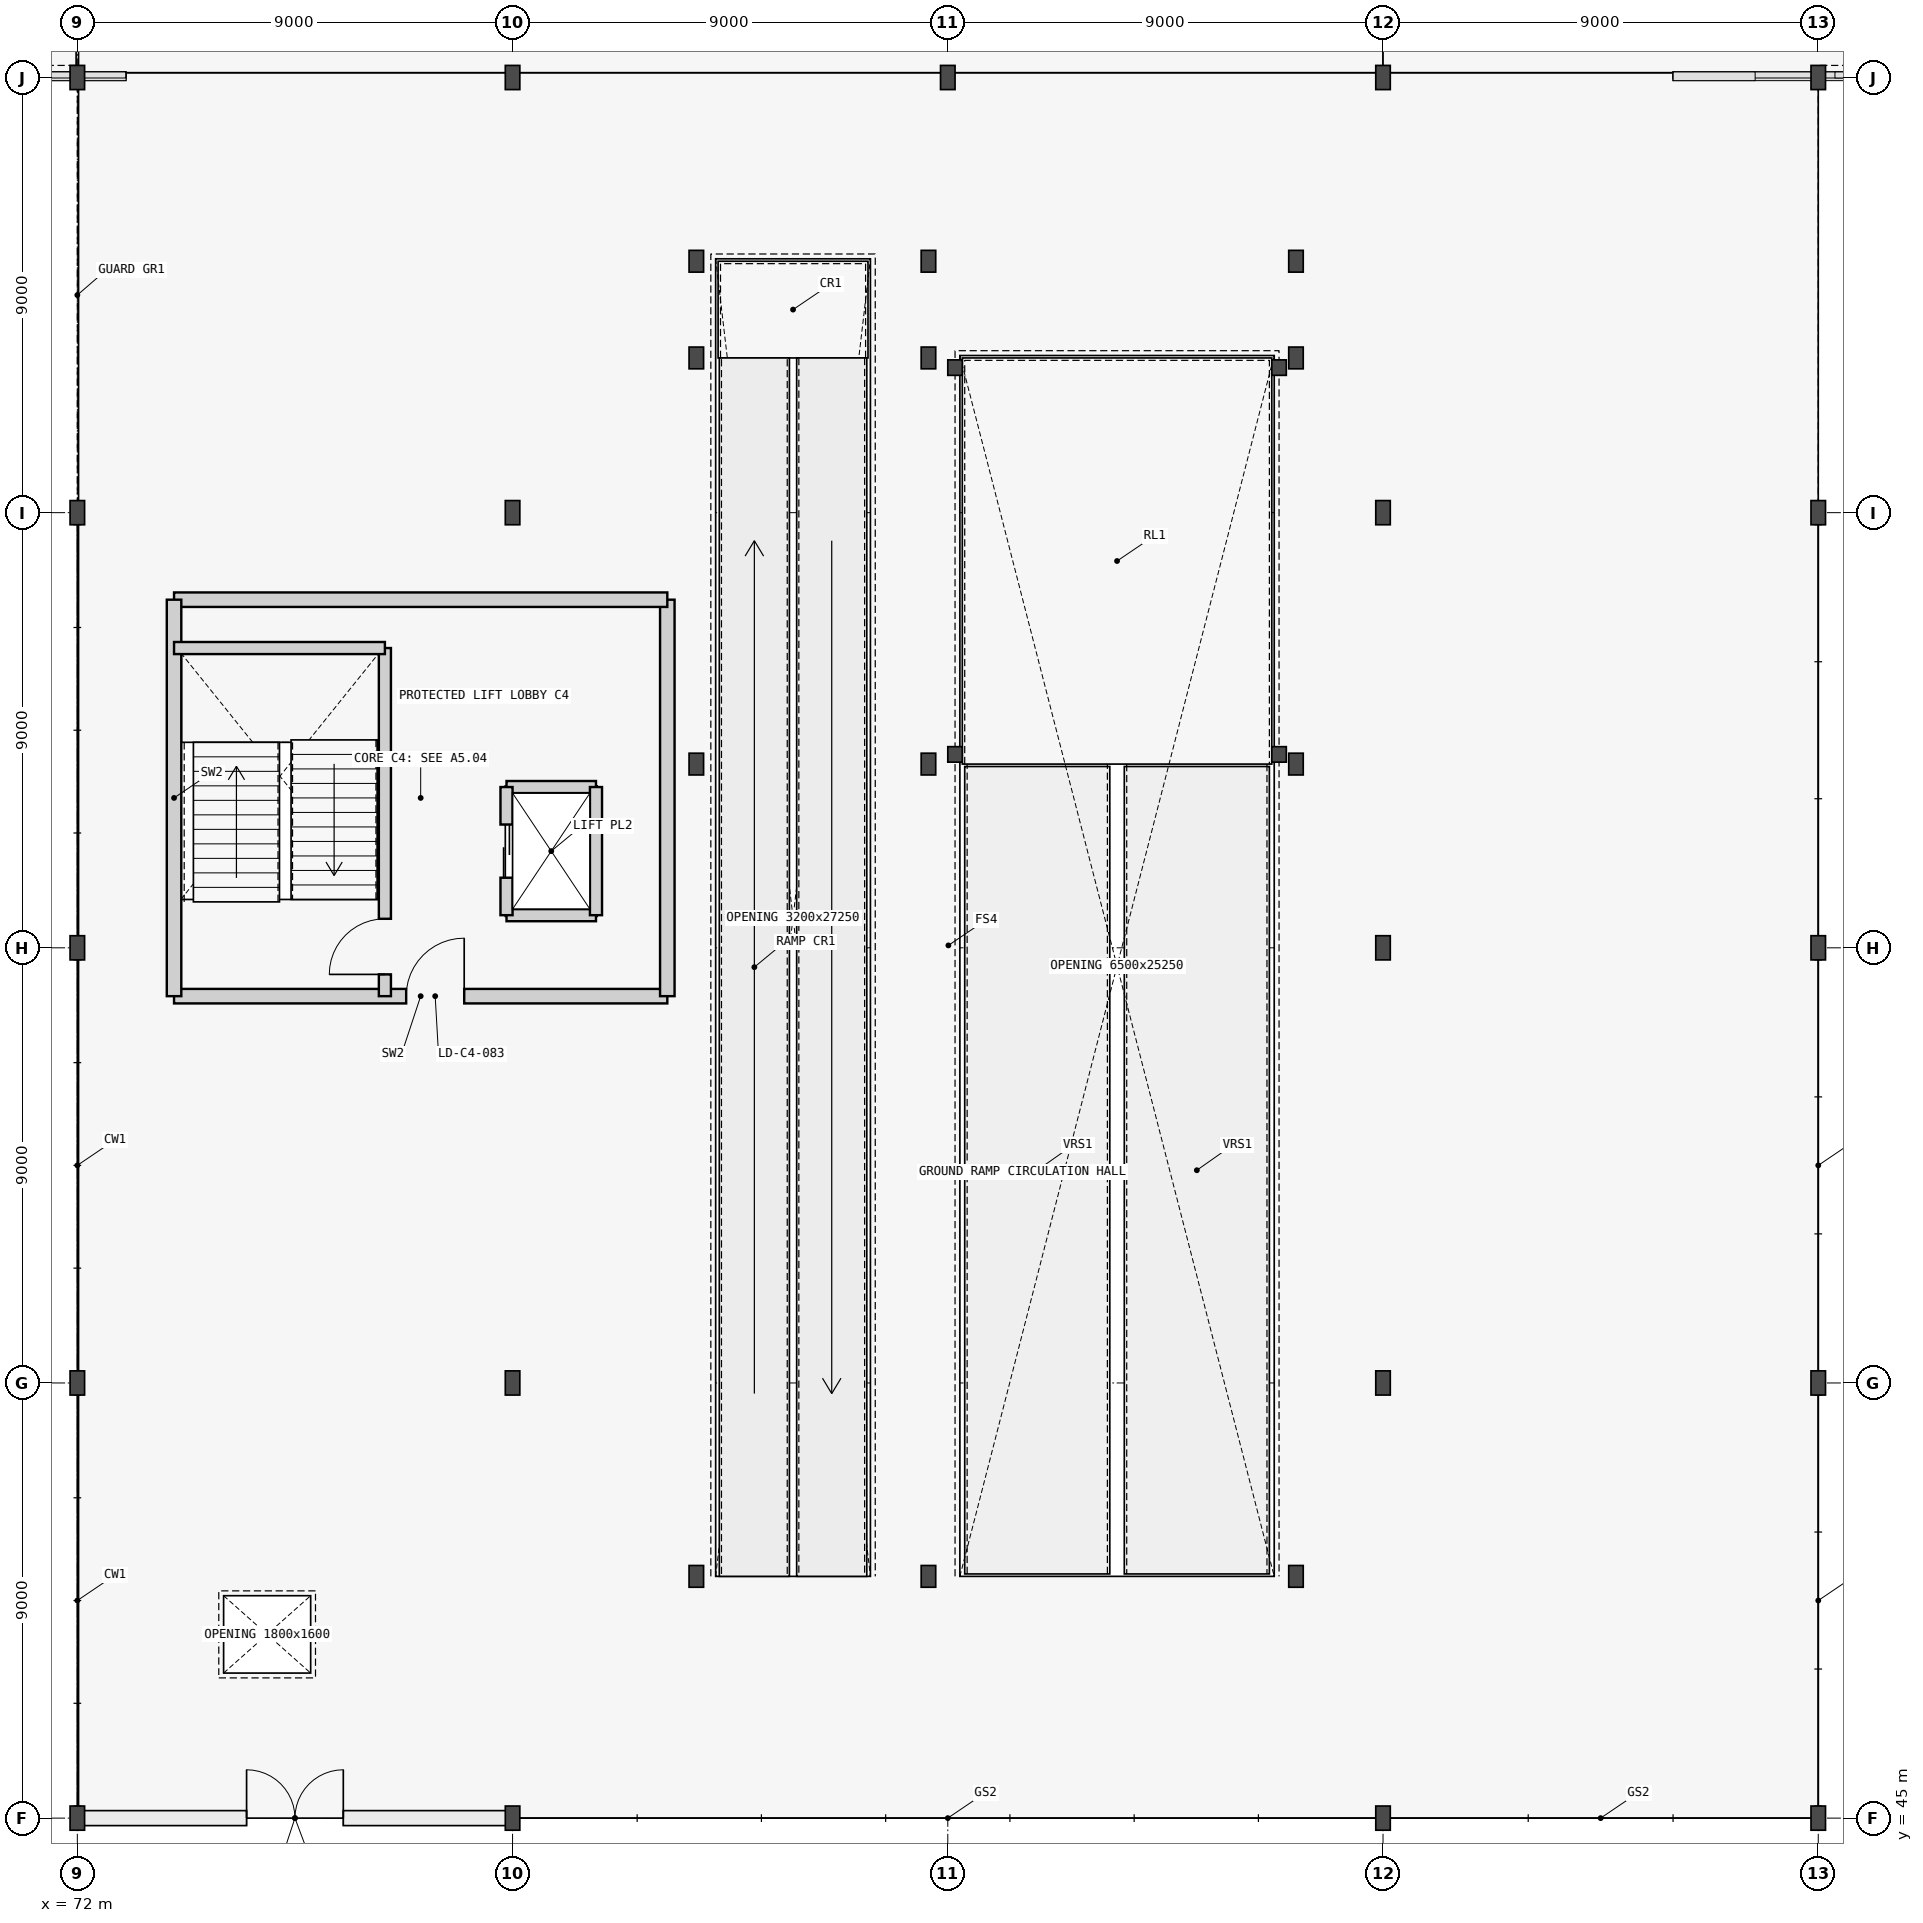
"""IFC4 building model, lengths in metres.
Left out: names, types, materials, properties, quantities, classifications, styles, units other than length and angle.
Written with IfcOpenShell. Run it as: python <this file> out.ifc"""

import sys

from ifc_helpers import new_model, si_unit, direction, frame, frame_2d, origin, origin_2d, place, context, subcontext, project, spatial, rectangle, i_section, extrude, element, fill, save


model = new_model("IFC4")
c1 = context("Model", 3, precision=1e-05, world=origin(), true_north=direction((0.0, 1.0)))
c2 = subcontext(c1, "Body", "Model", "MODEL_VIEW")
j1 = project(units=[si_unit("LENGTHUNIT", "METRE"), si_unit("PLANEANGLEUNIT", "RADIAN")], contexts=[c1])
p1 = place(None, origin())
s1 = spatial("IfcSite", under=j1, at=p1, CompositionType="ELEMENT")
p2 = place(p1, origin())
s2 = spatial("IfcBuilding", under=s1, at=p2, CompositionType="ELEMENT")
p3 = place(p2, origin())
s3 = spatial("IfcBuildingStorey", under=s2, at=p3, CompositionType="ELEMENT", Elevation=0.0)
for number, where, z_axis, x_axis in (
    (1, (72.0, 45.0, 0.0), (0.0, 0.0, 1.0), (1.0, 0.0, 0.0)),
    (2, (72.0, 54.0, 0.0), (0.0, 0.0, 1.0), (1.0, 0.0, 0.0)),
    (3, (72.0, 63.0, 0.0), (0.0, 0.0, 1.0), (1.0, 0.0, 0.0)),
    (4, (72.0, 72.0, 0.0), (0.0, 0.0, 1.0), (1.0, 0.0, 0.0)),
    (5, (72.0, 81.0, 0.0), (0.0, 0.0, 1.0), (1.0, 0.0, 0.0)),
    (6, (81.0, 45.0, 0.0), (0.0, 0.0, 1.0), (1.0, 0.0, 0.0)),
    (7, (81.0, 54.0, 0.0), (0.0, 0.0, 1.0), (1.0, 0.0, 0.0)),
    (8, (81.0, 72.0, 0.0), (0.0, 0.0, 1.0), (1.0, 0.0, 0.0)),
    (9, (81.0, 81.0, 0.0), (0.0, 0.0, 1.0), (1.0, 0.0, 0.0)),
    (10, (99.0, 45.0, 0.0), (0.0, 0.0, 1.0), (1.0, 0.0, 0.0)),
    (11, (99.0, 54.0, 0.0), (0.0, 0.0, 1.0), (1.0, 0.0, 0.0)),
    (12, (99.0, 63.0, 0.0), (0.0, 0.0, 1.0), (1.0, 0.0, 0.0)),
    (13, (99.0, 72.0, 0.0), (0.0, 0.0, 1.0), (1.0, 0.0, 0.0)),
    (14, (99.0, 81.0, 0.0), (0.0, 0.0, 1.0), (1.0, 0.0, 0.0)),
    (15, (108.0, 45.0, 0.0), (0.0, 0.0, 1.0), (1.0, 0.0, 0.0)),
    (16, (108.0, 54.0, 0.0), (0.0, 0.0, 1.0), (1.0, 0.0, 0.0)),
    (17, (108.0, 63.0, 0.0), (0.0, 0.0, 1.0), (1.0, 0.0, 0.0)),
    (18, (108.0, 72.0, 0.0), (0.0, 0.0, 1.0), (1.0, 0.0, 0.0)),
    (19, (108.0, 81.0, 0.0), (0.0, 0.0, 1.0), (1.0, 0.0, 0.0)),
):
    element("IfcColumn", number, at=place(p3, frame(where, z_axis=z_axis, x_axis=x_axis)), inside=s3, PredefinedType="COLUMN", context=c2, shape_type="SweptSolid", body=[
        extrude(i_section(OverallWidth=0.3, OverallDepth=0.5, WebThickness=0.014, FlangeThickness=0.028, FilletRadius=0.027, at=origin_2d()), origin(), (0.0, 0.0, 1.0), 4.2),
    ])
for number, where, z_axis, x_axis in (
    (20, (84.8, 50.0, 0.0), (0.0, 0.0, 1.0), (1.0, 0.0, 0.0)),
    (21, (84.8, 66.8, 0.0), (0.0, 0.0, 1.0), (1.0, 0.0, 0.0)),
    (22, (84.8, 75.2, 0.0), (0.0, 0.0, 1.0), (1.0, 0.0, 0.0)),
    (23, (84.8, 77.2, 0.0), (0.0, 0.0, 1.0), (1.0, 0.0, 0.0)),
    (24, (89.6, 50.0, 0.0), (0.0, 0.0, 1.0), (1.0, 0.0, 0.0)),
    (25, (89.6, 66.8, 0.0), (0.0, 0.0, 1.0), (1.0, 0.0, 0.0)),
    (26, (89.6, 75.2, 0.0), (0.0, 0.0, 1.0), (1.0, 0.0, 0.0)),
    (27, (89.6, 77.2, 0.0), (0.0, 0.0, 1.0), (1.0, 0.0, 0.0)),
    (28, (97.2, 50.0, 0.0), (0.0, 0.0, 1.0), (1.0, 0.0, 0.0)),
    (29, (97.2, 66.8, 0.0), (0.0, 0.0, 1.0), (1.0, 0.0, 0.0)),
    (30, (97.2, 75.2, 0.0), (0.0, 0.0, 1.0), (1.0, 0.0, 0.0)),
    (31, (97.2, 77.2, 0.0), (0.0, 0.0, 1.0), (1.0, 0.0, 0.0)),
):
    element("IfcColumn", number, at=place(p3, frame(where, z_axis=z_axis, x_axis=x_axis)), inside=s3, PredefinedType="COLUMN", context=c2, shape_type="SweptSolid", body=[
        extrude(i_section(OverallWidth=0.3, OverallDepth=0.45, WebThickness=0.014, FlangeThickness=0.026, FilletRadius=0.027, at=origin_2d()), origin(), (0.0, 0.0, 1.0), 4.2),
    ])
p4 = place(p3, frame((90.0, 81.0, 0.0), z_axis=(0.0, 0.0, 1.0), x_axis=(1.0, 0.0, 0.0)))
e32 = element("IfcColumn", 32, at=p4, inside=s3, PredefinedType="COLUMN", context=c2, shape_type="SweptSolid", body=[
    extrude(i_section(OverallWidth=0.3, OverallDepth=0.5, WebThickness=0.014, FlangeThickness=0.028, FilletRadius=0.027, at=origin_2d()), origin(), (0.0, 0.0, 1.0), 4.2),
])
for number, where, z_axis, x_axis in (
    (33, (90.15, 67.0, 0.0), (0.0, 0.0, 1.0), (1.0, 0.0, 0.0)),
    (34, (90.15, 75.0, 0.0), (0.0, 0.0, 1.0), (1.0, 0.0, 0.0)),
    (35, (96.85, 67.0, 0.0), (0.0, 0.0, 1.0), (1.0, 0.0, 0.0)),
    (36, (96.85, 75.0, 0.0), (0.0, 0.0, 1.0), (1.0, 0.0, 0.0)),
):
    element("IfcColumn", number, at=place(p3, frame(where, z_axis=z_axis, x_axis=x_axis)), inside=s3, PredefinedType="COLUMN", context=c2, shape_type="SweptSolid", body=[
        extrude(i_section(OverallWidth=0.3, OverallDepth=0.32, WebThickness=0.011, FlangeThickness=0.021, FilletRadius=0.027, at=origin_2d()), origin(), (0.0, 0.0, 1.0), 4.2),
    ])
p5 = place(p3, frame((72.007, 45.0, 0.0), z_axis=(0.0, 0.0, 1.0), x_axis=(1.0, 0.0, 0.0)))
e37 = element("IfcWall", 37, at=p5, inside=s3, PredefinedType="STANDARD", context=c2, shape_type="SweptSolid", body=[
    extrude(rectangle(XDim=8.986, YDim=0.31, at=frame_2d((4.493, 0.0))), origin(), (0.0, 0.0, 1.0), 3.95),
])
p6 = place(p5, frame((3.493, 0.0, 0.0)))
e38 = element("IfcOpeningElement", 38, at=p6, cuts=e37, PredefinedType="OPENING", context=c2, shape_type="SweptSolid", body=[
    extrude(rectangle(XDim=2.0, YDim=2.3, at=frame_2d((1.0, 1.15))), frame((0.0, 0.165, 0.0), z_axis=(0.0, -1.0, 0.0), x_axis=(1.0, 0.0, 0.0)), (0.0, 0.0, 1.0), 0.33),
])
p7 = place(p3, frame((74.0, 62.0, 0.0), z_axis=(0.0, 0.0, 1.0), x_axis=(1.0, 0.0, 0.0)))
e39 = element("IfcWall", 39, at=p7, inside=s3, PredefinedType="SHEAR", context=c2, shape_type="SweptSolid", body=[
    extrude(rectangle(XDim=10.2, YDim=0.3, at=frame_2d((5.1, 0.0))), origin(), (0.0, 0.0, 1.0), 3.95),
])
p8 = place(p7, frame((4.8, 0.0, 0.0)))
e40 = element("IfcOpeningElement", 40, at=p8, cuts=e39, PredefinedType="OPENING", context=c2, shape_type="SweptSolid", body=[
    extrude(rectangle(XDim=1.2, YDim=2.15, at=frame_2d((0.6, 1.075))), frame((0.0, 0.16, 0.0), z_axis=(0.0, -1.0, 0.0), x_axis=(1.0, 0.0, 0.0)), (0.0, 0.0, 1.0), 0.32),
])
p9 = place(p3, frame((84.2, 62.0, 0.0), z_axis=(0.0, 0.0, 1.0), x_axis=(0.0, 1.0, 0.0)))
e41 = element("IfcWall", 41, at=p9, inside=s3, PredefinedType="SHEAR", context=c2, shape_type="SweptSolid", body=[
    extrude(rectangle(XDim=8.2, YDim=0.3, at=frame_2d((4.1, 0.0))), origin(), (0.0, 0.0, 1.0), 3.95),
])
p10 = place(p3, frame((84.2, 70.2, 0.0), z_axis=(0.0, 0.0, 1.0), x_axis=(-1.0, 0.0, 0.0)))
e42 = element("IfcWall", 42, at=p10, inside=s3, PredefinedType="SHEAR", context=c2, shape_type="SweptSolid", body=[
    extrude(rectangle(XDim=10.2, YDim=0.3, at=frame_2d((5.1, 0.0))), origin(), (0.0, 0.0, 1.0), 3.95),
])
p11 = place(p3, frame((74.0, 70.2, 0.0), z_axis=(0.0, 0.0, 1.0), x_axis=(0.0, -1.0, 0.0)))
e43 = element("IfcWall", 43, at=p11, inside=s3, PredefinedType="SHEAR", context=c2, shape_type="SweptSolid", body=[
    extrude(rectangle(XDim=8.2, YDim=0.3, at=frame_2d((4.1, 0.0))), origin(), (0.0, 0.0, 1.0), 3.95),
])
p12 = place(p3, frame((78.36, 62.0, 0.0), z_axis=(0.0, 0.0, 1.0), x_axis=(0.0, 1.0, 0.0)))
e44 = element("IfcWall", 44, at=p12, inside=s3, PredefinedType="SHEAR", context=c2, shape_type="SweptSolid", body=[
    extrude(rectangle(XDim=7.2, YDim=0.25, at=frame_2d((3.6, 0.0))), origin(), (0.0, 0.0, 1.0), 3.95),
])
p13 = place(p12, frame((0.45, 0.0, 0.0)))
e45 = element("IfcOpeningElement", 45, at=p13, cuts=e44, PredefinedType="OPENING", context=c2, shape_type="SweptSolid", body=[
    extrude(rectangle(XDim=1.15, YDim=2.15, at=frame_2d((0.575, 1.075))), frame((0.0, 0.135, 0.0), z_axis=(0.0, -1.0, 0.0), x_axis=(1.0, 0.0, 0.0)), (0.0, 0.0, 1.0), 0.27),
])
p14 = place(p3, frame((74.0, 69.2, 0.0), z_axis=(0.0, 0.0, 1.0), x_axis=(1.0, 0.0, 0.0)))
e46 = element("IfcWall", 46, at=p14, inside=s3, PredefinedType="SHEAR", context=c2, shape_type="SweptSolid", body=[
    extrude(rectangle(XDim=4.36, YDim=0.25, at=frame_2d((2.18, 0.0))), origin(), (0.0, 0.0, 1.0), 3.95),
])
for number, where, z_axis, x_axis in (
    (47, (80.875, 63.675, 0.0), (0.0, 0.0, 1.0), (1.0, 0.0, 0.0)),
    (48, (80.875, 66.325, 0.0), (0.0, 0.0, 1.0), (1.0, 0.0, 0.0)),
):
    element("IfcWall", number, at=place(p3, frame(where, z_axis=z_axis, x_axis=x_axis)), inside=s3, PredefinedType="SHEAR", context=c2, shape_type="SweptSolid", body=[
        extrude(rectangle(XDim=1.85, YDim=0.25, at=frame_2d((0.925, 0.0))), origin(), (0.0, 0.0, 1.0), 3.95),
    ])
p15 = place(p3, frame((82.725, 63.675, 0.0), z_axis=(0.0, 0.0, 1.0), x_axis=(0.0, 1.0, 0.0)))
e49 = element("IfcWall", 49, at=p15, inside=s3, PredefinedType="SHEAR", context=c2, shape_type="SweptSolid", body=[
    extrude(rectangle(XDim=2.65, YDim=0.25, at=frame_2d((1.325, 0.0))), origin(), (0.0, 0.0, 1.0), 3.95),
])
p16 = place(p3, frame((80.875, 63.675, 0.0), z_axis=(0.0, 0.0, 1.0), x_axis=(0.0, 1.0, 0.0)))
e50 = element("IfcWall", 50, at=p16, inside=s3, PredefinedType="SHEAR", context=c2, shape_type="SweptSolid", body=[
    extrude(rectangle(XDim=2.65, YDim=0.25, at=frame_2d((1.325, 0.0))), origin(), (0.0, 0.0, 1.0), 3.95),
])
p17 = place(p16, frame((0.775, 0.0, 0.0)))
e51 = element("IfcOpeningElement", 51, at=p17, cuts=e50, PredefinedType="OPENING", context=c2, shape_type="SweptSolid", body=[
    extrude(rectangle(XDim=1.1, YDim=2.15, at=frame_2d((0.55, 1.075))), frame((0.0, 0.135, 0.0), z_axis=(0.0, -1.0, 0.0), x_axis=(1.0, 0.0, 0.0)), (0.0, 0.0, 1.0), 0.27),
])
p18 = place(p6, frame((2.0, 0.0, 0.0), z_axis=(0.0, 0.0, 1.0), x_axis=(-1.0, 0.0, 0.0)))
e52 = element("IfcDoor", 52, at=p18, inside=s3, OperationType="DOUBLE_DOOR_SINGLE_SWING", PredefinedType="DOOR", context=c2, shape_type="SweptSolid", body=[
    extrude(rectangle(XDim=2.0, YDim=2.3, at=frame_2d((1.0, 1.15))), frame((0.0, 0.025, 0.0), z_axis=(0.0, -1.0, 0.0), x_axis=(1.0, 0.0, 0.0)), (0.0, 0.0, 1.0), 0.05),
])
fill(e38, e52)
p19 = place(p13, origin())
e53 = element("IfcDoor", 53, at=p19, inside=s3, OperationType="SINGLE_SWING_LEFT", PredefinedType="DOOR", context=c2, shape_type="SweptSolid", body=[
    extrude(rectangle(XDim=1.15, YDim=2.15, at=frame_2d((0.575, 1.075))), frame((0.0, 0.025, 0.0), z_axis=(0.0, -1.0, 0.0), x_axis=(1.0, 0.0, 0.0)), (0.0, 0.0, 1.0), 0.05),
])
fill(e45, e53)
p20 = place(p8, origin())
e54 = element("IfcDoor", 54, at=p20, inside=s3, OperationType="SINGLE_SWING_RIGHT", PredefinedType="DOOR", context=c2, shape_type="SweptSolid", body=[
    extrude(rectangle(XDim=1.2, YDim=2.15, at=frame_2d((0.6, 1.075))), frame((0.0, 0.025, 0.0), z_axis=(0.0, -1.0, 0.0), x_axis=(1.0, 0.0, 0.0)), (0.0, 0.0, 1.0), 0.05),
])
fill(e40, e54)
p21 = place(p17, origin())
e55 = element("IfcDoor", 55, at=p21, inside=s3, OperationType="DOUBLE_DOOR_SLIDING", PredefinedType="USERDEFINED", context=c2, shape_type="SweptSolid", body=[
    extrude(rectangle(XDim=1.1, YDim=2.15, at=frame_2d((0.55, 1.075))), frame((0.0, 0.025, 0.0), z_axis=(0.0, -1.0, 0.0), x_axis=(1.0, 0.0, 0.0)), (0.0, 0.0, 1.0), 0.05),
])
fill(e51, e55)
save(model, sys.argv[1])
